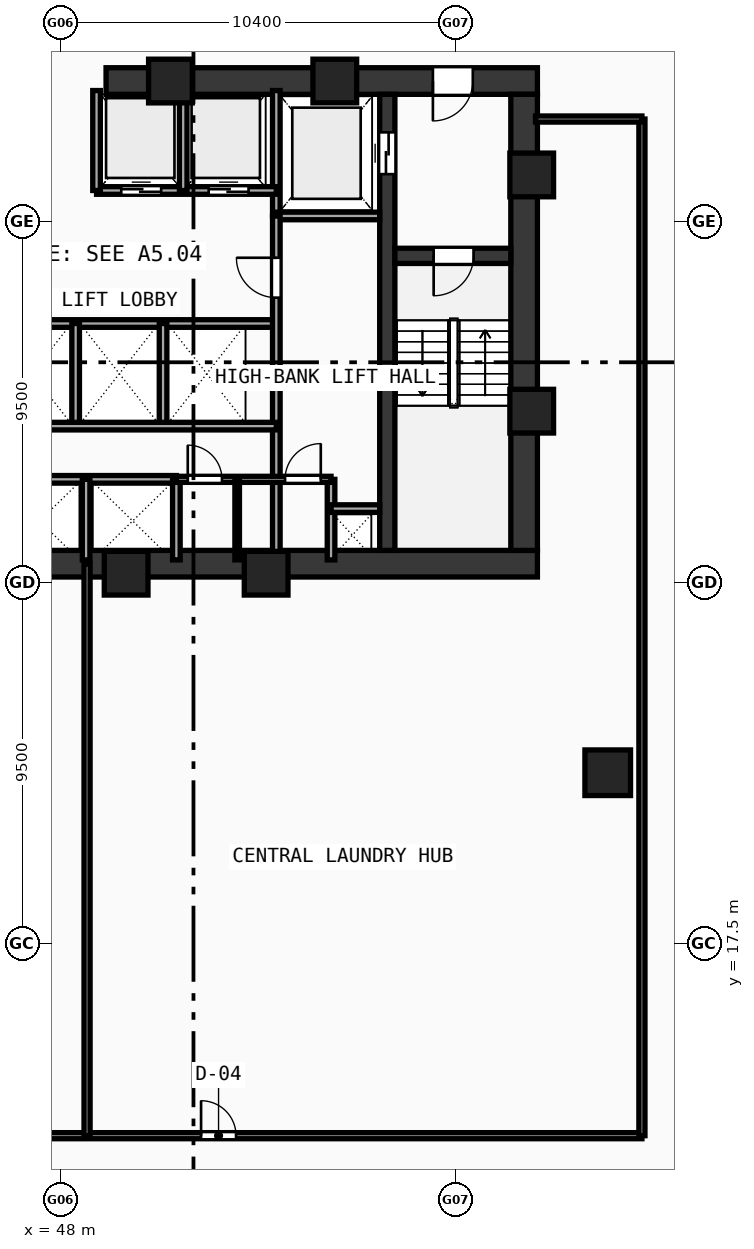
"""IFC4 building model, lengths in metres.
Left out: names, types, materials, properties, quantities, classifications, styles, units other than length and angle.
Written with IfcOpenShell. Run it as: python <this file> out.ifc"""

import sys

from ifc_helpers import new_model, si_unit, direction, frame, frame_2d, origin, origin_with_axes, origin_2d, place, context, subcontext, project, spatial, rectangle, hollow_rectangle, extrude, source, transform, mapped, element, fill, save


model = new_model("IFC4")
c1 = context("Model", 3, precision=1e-05, world=origin(), true_north=direction((0.0, 1.0)))
c2 = subcontext(c1, "Body", "Model", "MODEL_VIEW")
j1 = project(units=[si_unit("LENGTHUNIT", "METRE"), si_unit("PLANEANGLEUNIT", "RADIAN")], contexts=[c1])
p1 = place(None, origin())
s1 = spatial("IfcSite", under=j1, at=p1, CompositionType="ELEMENT")
p2 = place(p1, origin())
s2 = spatial("IfcBuilding", under=s1, at=p2, CompositionType="ELEMENT")
p3 = place(p2, frame((0.0, 0.0, 19.2)))
s3 = spatial("IfcBuildingStorey", under=s2, at=p3, CompositionType="ELEMENT", Elevation=19.2)
p4 = place(p3, frame((35.45, 27.5, 0.0), z_axis=(0.0, 0.0, 1.0), x_axis=(1.0, 0.0, 0.0)))
e1 = element("IfcWall", 1, at=p4, inside=s3, PredefinedType="SHEAR", context=c2, shape_type="SweptSolid", body=[
    extrude(rectangle(XDim=25.1, YDim=0.7, at=frame_2d((12.55, 0.0))), origin(), (0.0, 0.0, 1.0), 5.92),
])
p5 = place(p3, frame((49.2, 40.2, 0.0), z_axis=(0.0, 0.0, 1.0), x_axis=(1.0, 0.0, 0.0)))
e2 = element("IfcWall", 2, at=p5, inside=s3, PredefinedType="SHEAR", context=c2, shape_type="SweptSolid", body=[
    extrude(rectangle(XDim=11.35, YDim=0.7, at=frame_2d((5.675, 0.0))), origin(), (0.0, 0.0, 1.0), 5.92),
])
p6 = place(p5, frame((8.6, 0.0, 0.0)))
e3 = element("IfcOpeningElement", 3, at=p6, cuts=e2, PredefinedType="OPENING", context=c2, shape_type="SweptSolid", body=[
    extrude(rectangle(XDim=1.05, YDim=2.1, at=frame_2d((0.525, 1.05))), frame((0.0, 0.36, 0.0), z_axis=(0.0, -1.0, 0.0), x_axis=(1.0, 0.0, 0.0)), (0.0, 0.0, 1.0), 0.72),
])
p7 = place(p3, frame((60.2, 27.85, 0.0), z_axis=(0.0, 0.0, 1.0), x_axis=(0.0, 1.0, 0.0)))
e4 = element("IfcWall", 4, at=p7, inside=s3, PredefinedType="SHEAR", context=c2, shape_type="SweptSolid", body=[
    extrude(rectangle(XDim=12.0, YDim=0.7, at=frame_2d((6.0, 0.0))), origin(), (0.0, 0.0, 1.0), 5.92),
])
p8 = place(p3, frame((56.6, 27.85, 0.0), z_axis=(0.0, 0.0, 1.0), x_axis=(0.0, 1.0, 0.0)))
e5 = element("IfcWall", 5, at=p8, inside=s3, PredefinedType="SHEAR", context=c2, shape_type="SweptSolid", body=[
    extrude(rectangle(XDim=12.0, YDim=0.4, at=frame_2d((6.0, 0.0))), origin(), (0.0, 0.0, 1.0), 5.92),
])
p9 = place(p8, frame((9.9, 0.0, 0.0)))
e6 = element("IfcOpeningElement", 6, at=p9, cuts=e5, PredefinedType="OPENING", context=c2, shape_type="SweptSolid", body=[
    extrude(rectangle(XDim=1.1, YDim=2.1, at=frame_2d((0.55, 1.05))), frame((0.0, 0.21, 0.0), z_axis=(0.0, -1.0, 0.0), x_axis=(1.0, 0.0, 0.0)), (0.0, 0.0, 1.0), 0.42),
])
p10 = place(p3, frame((56.8, 35.6, 0.0), z_axis=(0.0, 0.0, 1.0), x_axis=(1.0, 0.0, 0.0)))
e7 = element("IfcWall", 7, at=p10, inside=s3, PredefinedType="SHEAR", context=c2, shape_type="SweptSolid", body=[
    extrude(rectangle(XDim=3.05, YDim=0.4, at=frame_2d((1.525, 0.0))), origin(), (0.0, 0.0, 1.0), 5.92),
])
p11 = place(p10, frame((1.02, 0.0, 0.0)))
e8 = element("IfcOpeningElement", 8, at=p11, cuts=e7, PredefinedType="OPENING", context=c2, shape_type="SweptSolid", body=[
    extrude(rectangle(XDim=1.05, YDim=2.1, at=frame_2d((0.525, 1.05))), frame((0.0, 0.21, 0.0), z_axis=(0.0, -1.0, 0.0), x_axis=(1.0, 0.0, 0.0)), (0.0, 0.0, 1.0), 0.42),
])
m1 = source(origin(), c2, "Body", "SweptSolid", [
    extrude(hollow_rectangle(XDim=1.15, YDim=1.15, WallThickness=0.048, at=origin_2d()), origin(), (0.0, 0.0, 1.0), 6.2),
])
for number, where, z_axis, x_axis in (
    (9, (49.729, 27.25, -0.28), (0.0, 0.0, 1.0), (1.0, 0.0, 0.0)),
    (10, (53.412, 27.25, -0.28), (0.0, 0.0, 1.0), (1.0, 0.0, 0.0)),
    (11, (60.4, 31.513, -0.28), (0.0, 0.0, 1.0), (1.0, 0.0, 0.0)),
    (12, (60.4, 37.729, -0.28), (0.0, 0.0, 1.0), (1.0, 0.0, 0.0)),
    (13, (55.219, 40.2, -0.28), (0.0, 0.0, 1.0), (1.0, 0.0, 0.0)),
    (14, (50.894, 40.2, -0.28), (0.0, 0.0, 1.0), (1.0, 0.0, 0.0)),
):
    element("IfcColumn", number, at=place(p3, frame(where, z_axis=z_axis, x_axis=x_axis)), inside=s3, PredefinedType="COLUMN", context=c2, shape_type="MappedRepresentation", body=[
        mapped(m1, transform((0.0, 0.0, 0.0), scale=1.0)),
    ])
m2 = source(origin(), c2, "Body", "SweptSolid", [
    extrude(hollow_rectangle(XDim=1.2, YDim=1.2, WallThickness=0.05, at=origin_2d()), origin(), (0.0, 0.0, 1.0), 6.2),
])
p12 = place(p3, frame((62.4, 22.0, -0.28), z_axis=(0.0, 0.0, 1.0), x_axis=(1.0, 0.0, 0.0)))
e15 = element("IfcColumn", 15, at=p12, inside=s3, PredefinedType="COLUMN", context=c2, shape_type="MappedRepresentation", body=[
    mapped(m2, transform((0.0, 0.0, 0.0), scale=1.0)),
])
p13 = place(p3, frame((53.68, 36.65, 0.0), z_axis=(0.0, 0.0, 1.0), x_axis=(0.0, 1.0, 0.0)))
e16 = element("IfcWall", 16, at=p13, inside=s3, PredefinedType="SOLIDWALL", context=c2, shape_type="SweptSolid", body=[
    extrude(rectangle(XDim=3.3, YDim=0.2, at=frame_2d((1.65, 0.0))), origin(), (0.0, 0.0, 1.0), 5.92),
])
p14 = place(p3, frame((53.68, 36.65, 0.0), z_axis=(0.0, 0.0, 1.0), x_axis=(1.0, 0.0, 0.0)))
e17 = element("IfcWall", 17, at=p14, inside=s3, PredefinedType="SOLIDWALL", context=c2, shape_type="SweptSolid", body=[
    extrude(rectangle(XDim=2.72, YDim=0.2, at=frame_2d((1.36, 0.0))), origin(), (0.0, 0.0, 1.0), 5.92),
])
p15 = place(p3, frame((48.95, 37.32, 0.0), z_axis=(0.0, 0.0, 1.0), x_axis=(1.0, 0.0, 0.0)))
e18 = element("IfcWall", 18, at=p15, inside=s3, PredefinedType="SOLIDWALL", context=c2, shape_type="SweptSolid", body=[
    extrude(rectangle(XDim=4.73, YDim=0.2, at=frame_2d((2.365, 0.0))), origin(), (0.0, 0.0, 1.0), 5.92),
])
p16 = place(p15, frame((0.65, 0.0, 0.0)))
e19 = element("IfcOpeningElement", 19, at=p16, cuts=e18, PredefinedType="OPENING", context=c2, shape_type="SweptSolid", body=[
    extrude(rectangle(XDim=1.05, YDim=2.1, at=frame_2d((0.525, 1.05))), frame((0.0, 0.11, 0.0), z_axis=(0.0, -1.0, 0.0), x_axis=(1.0, 0.0, 0.0)), (0.0, 0.0, 1.0), 0.22),
])
p17 = place(p15, frame((2.95, 0.0, 0.0)))
e20 = element("IfcOpeningElement", 20, at=p17, cuts=e18, PredefinedType="OPENING", context=c2, shape_type="SweptSolid", body=[
    extrude(rectangle(XDim=1.05, YDim=2.1, at=frame_2d((0.525, 1.05))), frame((0.0, 0.11, 0.0), z_axis=(0.0, -1.0, 0.0), x_axis=(1.0, 0.0, 0.0)), (0.0, 0.0, 1.0), 0.22),
])
p18 = place(p3, frame((48.95, 37.32, 0.0), z_axis=(0.0, 0.0, 1.0), x_axis=(0.0, 1.0, 0.0)))
e21 = element("IfcWall", 21, at=p18, inside=s3, PredefinedType="SOLIDWALL", context=c2, shape_type="SweptSolid", body=[
    extrude(rectangle(XDim=2.63, YDim=0.2, at=frame_2d((1.315, 0.0))), origin(), (0.0, 0.0, 1.0), 5.92),
])
p19 = place(p3, frame((51.23, 37.32, 0.0), z_axis=(0.0, 0.0, 1.0), x_axis=(0.0, 1.0, 0.0)))
e22 = element("IfcWall", 22, at=p19, inside=s3, PredefinedType="SOLIDWALL", context=c2, shape_type="SweptSolid", body=[
    extrude(rectangle(XDim=2.63, YDim=0.2, at=frame_2d((1.315, 0.0))), origin(), (0.0, 0.0, 1.0), 2.42),
])
p20 = place(p3, frame((43.85, 33.82, 0.0), z_axis=(0.0, 0.0, 1.0), x_axis=(1.0, 0.0, 0.0)))
e23 = element("IfcWall", 23, at=p20, inside=s3, PredefinedType="SOLIDWALL", context=c2, shape_type="SweptSolid", body=[
    extrude(rectangle(XDim=9.83, YDim=0.2, at=frame_2d((4.915, 0.0))), origin(), (0.0, 0.0, 1.0), 5.92),
])
p21 = place(p3, frame((53.68, 27.6, 0.0), z_axis=(0.0, 0.0, 1.0), x_axis=(0.0, 1.0, 0.0)))
e24 = element("IfcWall", 24, at=p21, inside=s3, PredefinedType="SOLIDWALL", context=c2, shape_type="SweptSolid", body=[
    extrude(rectangle(XDim=9.05, YDim=0.2, at=frame_2d((4.525, 0.0))), origin(), (0.0, 0.0, 1.0), 2.42),
])
p22 = place(p21, frame((6.9, 0.0, 0.0)))
e25 = element("IfcOpeningElement", 25, at=p22, cuts=e24, PredefinedType="OPENING", context=c2, shape_type="SweptSolid", body=[
    extrude(rectangle(XDim=1.05, YDim=2.1, at=frame_2d((0.525, 1.05))), frame((0.0, 0.11, 0.0), z_axis=(0.0, -1.0, 0.0), x_axis=(1.0, 0.0, 0.0)), (0.0, 0.0, 1.0), 0.22),
])
for number, where, z_axis, x_axis in (
    (26, (48.4, 31.12, 0.0), (0.0, 0.0, 1.0), (0.0, 1.0, 0.0)),
    (27, (50.7, 31.12, 0.0), (0.0, 0.0, 1.0), (0.0, 1.0, 0.0)),
):
    element("IfcWall", number, at=place(p3, frame(where, z_axis=z_axis, x_axis=x_axis)), inside=s3, PredefinedType="SOLIDWALL", context=c2, shape_type="SweptSolid", body=[
        extrude(rectangle(XDim=2.7, YDim=0.2, at=frame_2d((1.35, 0.0))), origin(), (0.0, 0.0, 1.0), 5.92),
    ])
p23 = place(p3, frame((43.85, 29.72, 0.0), z_axis=(0.0, 0.0, 1.0), x_axis=(1.0, 0.0, 0.0)))
e28 = element("IfcWall", 28, at=p23, inside=s3, PredefinedType="SOLIDWALL", context=c2, shape_type="SweptSolid", body=[
    extrude(rectangle(XDim=7.2, YDim=0.2, at=frame_2d((3.6, 0.0))), origin(), (0.0, 0.0, 1.0), 5.92),
])
p24 = place(p3, frame((51.05, 27.6, 0.0), z_axis=(0.0, 0.0, 1.0), x_axis=(0.0, 1.0, 0.0)))
e29 = element("IfcWall", 29, at=p24, inside=s3, PredefinedType="SOLIDWALL", context=c2, shape_type="SweptSolid", body=[
    extrude(rectangle(XDim=2.12, YDim=0.2, at=frame_2d((1.06, 0.0))), origin(), (0.0, 0.0, 1.0), 5.92),
])
p25 = place(p3, frame((43.85, 31.12, 0.0), z_axis=(0.0, 0.0, 1.0), x_axis=(1.0, 0.0, 0.0)))
e30 = element("IfcWall", 30, at=p25, inside=s3, PredefinedType="SOLIDWALL", context=c2, shape_type="SweptSolid", body=[
    extrude(rectangle(XDim=9.83, YDim=0.2, at=frame_2d((4.915, 0.0))), origin(), (0.0, 0.0, 1.0), 5.92),
])
for number, where, z_axis, x_axis in (
    (31, (48.675, 27.6, 0.0), (0.0, 0.0, 1.0), (0.0, 1.0, 0.0)),
    (32, (55.12, 27.6, 0.0), (0.0, 0.0, 1.0), (0.0, 1.0, 0.0)),
):
    element("IfcWall", number, at=place(p3, frame(where, z_axis=z_axis, x_axis=x_axis)), inside=s3, PredefinedType="SOLIDWALL", context=c2, shape_type="SweptSolid", body=[
        extrude(rectangle(XDim=2.12, YDim=0.2, at=frame_2d((1.06, 0.0))), origin(), (0.0, 0.0, 1.0), 5.92),
    ])
p26 = place(p3, frame((55.12, 28.95, 0.0), z_axis=(0.0, 0.0, 1.0), x_axis=(1.0, 0.0, 0.0)))
e33 = element("IfcWall", 33, at=p26, inside=s3, PredefinedType="SOLIDWALL", context=c2, shape_type="SweptSolid", body=[
    extrude(rectangle(XDim=1.28, YDim=0.2, at=frame_2d((0.64, 0.0))), origin(), (0.0, 0.0, 1.0), 5.92),
])
p27 = place(p3, frame((51.05, 29.72, 0.0), z_axis=(0.0, 0.0, 1.0), x_axis=(1.0, 0.0, 0.0)))
e34 = element("IfcWall", 34, at=p27, inside=s3, PredefinedType="PARTITIONING", context=c2, shape_type="SweptSolid", body=[
    extrude(rectangle(XDim=4.07, YDim=0.16, at=frame_2d((2.035, 0.0))), origin(), (0.0, 0.0, 1.0), 5.92),
])
p28 = place(p27, frame((0.3, 0.0, 0.0)))
e35 = element("IfcOpeningElement", 35, at=p28, cuts=e34, PredefinedType="OPENING", context=c2, shape_type="SweptSolid", body=[
    extrude(rectangle(XDim=0.9, YDim=2.1, at=frame_2d((0.45, 1.05))), frame((0.0, 0.09, 0.0), z_axis=(0.0, -1.0, 0.0), x_axis=(1.0, 0.0, 0.0)), (0.0, 0.0, 1.0), 0.18),
])
p29 = place(p27, frame((2.86, 0.0, 0.0)))
e36 = element("IfcOpeningElement", 36, at=p29, cuts=e34, PredefinedType="OPENING", context=c2, shape_type="SweptSolid", body=[
    extrude(rectangle(XDim=0.94, YDim=2.1, at=frame_2d((0.47, 1.05))), frame((0.0, 0.09, 0.0), z_axis=(0.0, -1.0, 0.0), x_axis=(1.0, 0.0, 0.0)), (0.0, 0.0, 1.0), 0.18),
])
p30 = place(p3, frame((52.65, 27.6, 0.0), z_axis=(0.0, 0.0, 1.0), x_axis=(0.0, 1.0, 0.0)))
e37 = element("IfcWall", 37, at=p30, inside=s3, PredefinedType="PARTITIONING", context=c2, shape_type="SweptSolid", body=[
    extrude(rectangle(XDim=2.12, YDim=0.12, at=frame_2d((1.06, 0.0))), origin(), (0.0, 0.0, 1.0), 5.92),
])
p31 = place(p3, frame((32.7, 12.45, 0.0), z_axis=(0.0, 0.0, 1.0), x_axis=(1.0, 0.0, 0.0)))
e38 = element("IfcWall", 38, at=p31, inside=s3, PredefinedType="PARTITIONING", context=c2, shape_type="SweptSolid", body=[
    extrude(rectangle(XDim=30.6, YDim=0.16, at=frame_2d((15.3, 0.0))), origin(), (0.0, 0.0, 1.0), 2.42),
])
p32 = place(p31, frame((19.0, 0.0, 0.0)))
e39 = element("IfcOpeningElement", 39, at=p32, cuts=e38, PredefinedType="OPENING", context=c2, shape_type="SweptSolid", body=[
    extrude(rectangle(XDim=0.92, YDim=2.1, at=frame_2d((0.46, 1.05))), frame((0.0, 0.09, 0.0), z_axis=(0.0, -1.0, 0.0), x_axis=(1.0, 0.0, 0.0)), (0.0, 0.0, 1.0), 0.18),
])
p33 = place(p31, frame((5.9, 0.0, 0.0)))
e40 = element("IfcOpeningElement", 40, at=p33, cuts=e38, PredefinedType="OPENING", context=c2, shape_type="SweptSolid", body=[
    extrude(rectangle(XDim=0.94, YDim=2.1, at=frame_2d((0.47, 1.05))), frame((0.0, 0.09, 0.0), z_axis=(0.0, -1.0, 0.0), x_axis=(1.0, 0.0, 0.0)), (0.0, 0.0, 1.0), 0.18),
])
p34 = place(p3, frame((63.3, 12.45, 0.0), z_axis=(0.0, 0.0, 1.0), x_axis=(0.0, 1.0, 0.0)))
e41 = element("IfcWall", 41, at=p34, inside=s3, PredefinedType="PARTITIONING", context=c2, shape_type="SweptSolid", body=[
    extrude(rectangle(XDim=26.75, YDim=0.16, at=frame_2d((13.375, 0.0))), origin(), (0.0, 0.0, 1.0), 2.42),
])
p35 = place(p3, frame((60.5, 39.2, 0.0), z_axis=(0.0, 0.0, 1.0), x_axis=(1.0, 0.0, 0.0)))
e42 = element("IfcWall", 42, at=p35, inside=s3, PredefinedType="PARTITIONING", context=c2, shape_type="SweptSolid", body=[
    extrude(rectangle(XDim=2.8, YDim=0.16, at=frame_2d((1.4, 0.0))), origin(), (0.0, 0.0, 1.0), 2.42),
])
p36 = place(p3, frame((48.7, 12.45, 0.0), z_axis=(0.0, 0.0, 1.0), x_axis=(0.0, 1.0, 0.0)))
e43 = element("IfcWall", 43, at=p36, inside=s3, PredefinedType="PARTITIONING", context=c2, shape_type="SweptSolid", body=[
    extrude(rectangle(XDim=15.05, YDim=0.16, at=frame_2d((7.525, 0.0))), origin(), (0.0, 0.0, 1.0), 5.22),
])
m3 = source(origin(), c2, "Body", "SweptSolid", [
    extrude(rectangle(XDim=1.05, YDim=2.1, at=frame_2d((0.525, 1.05))), frame((0.0, 0.025, 0.0), z_axis=(0.0, -1.0, 0.0), x_axis=(1.0, 0.0, 0.0)), (0.0, 0.0, 1.0), 0.05),
])
p37 = place(p11, frame((1.05, 0.0, 0.0), z_axis=(0.0, 0.0, 1.0), x_axis=(-1.0, 0.0, 0.0)))
e44 = element("IfcDoor", 44, at=p37, inside=s3, OperationType="SINGLE_SWING_RIGHT", PredefinedType="DOOR", context=c2, shape_type="MappedRepresentation", body=[
    mapped(m3, transform((0.0, 0.0, 0.0), scale=1.0)),
])
fill(e8, e44)
p38 = place(p6, frame((1.05, 0.0, 0.0), z_axis=(0.0, 0.0, 1.0), x_axis=(-1.0, 0.0, 0.0)))
e45 = element("IfcDoor", 45, at=p38, inside=s3, OperationType="SINGLE_SWING_RIGHT", PredefinedType="DOOR", context=c2, shape_type="MappedRepresentation", body=[
    mapped(m3, transform((0.0, 0.0, 0.0), scale=1.0)),
])
fill(e3, e45)
m4 = source(origin(), c2, "Body", "SweptSolid", [
    extrude(rectangle(XDim=1.1, YDim=2.1, at=frame_2d((0.55, 1.05))), frame((0.0, 0.025, 0.0), z_axis=(0.0, -1.0, 0.0), x_axis=(1.0, 0.0, 0.0)), (0.0, 0.0, 1.0), 0.05),
])
p39 = place(p9, origin_with_axes())
e46 = element("IfcDoor", 46, at=p39, inside=s3, OperationType="DOUBLE_DOOR_SLIDING", PredefinedType="DOOR", context=c2, shape_type="MappedRepresentation", body=[
    mapped(m4, transform((0.0, 0.0, 0.0), scale=1.0)),
])
fill(e6, e46)
p40 = place(p16, frame((1.05, 0.0, 0.0), z_axis=(0.0, 0.0, 1.0), x_axis=(-1.0, 0.0, 0.0)))
e47 = element("IfcDoor", 47, at=p40, inside=s3, OperationType="DOUBLE_DOOR_SLIDING", PredefinedType="DOOR", context=c2, shape_type="MappedRepresentation", body=[
    mapped(m3, transform((0.0, 0.0, 0.0), scale=1.0)),
])
fill(e19, e47)
p41 = place(p17, frame((1.05, 0.0, 0.0), z_axis=(0.0, 0.0, 1.0), x_axis=(-1.0, 0.0, 0.0)))
e48 = element("IfcDoor", 48, at=p41, inside=s3, OperationType="DOUBLE_DOOR_SLIDING", PredefinedType="DOOR", context=c2, shape_type="MappedRepresentation", body=[
    mapped(m3, transform((0.0, 0.0, 0.0), scale=1.0)),
])
fill(e20, e48)
p42 = place(p22, origin_with_axes())
e49 = element("IfcDoor", 49, at=p42, inside=s3, OperationType="SINGLE_SWING_RIGHT", PredefinedType="DOOR", context=c2, shape_type="MappedRepresentation", body=[
    mapped(m3, transform((0.0, 0.0, 0.0), scale=1.0)),
])
fill(e25, e49)
m5 = source(origin(), c2, "Body", "SweptSolid", [
    extrude(rectangle(XDim=0.9, YDim=2.1, at=frame_2d((0.45, 1.05))), frame((0.0, 0.025, 0.0), z_axis=(0.0, -1.0, 0.0), x_axis=(1.0, 0.0, 0.0)), (0.0, 0.0, 1.0), 0.05),
])
p43 = place(p28, origin_with_axes())
e50 = element("IfcDoor", 50, at=p43, inside=s3, OperationType="SINGLE_SWING_LEFT", PredefinedType="DOOR", context=c2, shape_type="MappedRepresentation", body=[
    mapped(m5, transform((0.0, 0.0, 0.0), scale=1.0)),
])
fill(e35, e50)
m6 = source(origin(), c2, "Body", "SweptSolid", [
    extrude(rectangle(XDim=0.94, YDim=2.1, at=frame_2d((0.47, 1.05))), frame((0.0, 0.025, 0.0), z_axis=(0.0, -1.0, 0.0), x_axis=(1.0, 0.0, 0.0)), (0.0, 0.0, 1.0), 0.05),
])
p44 = place(p29, origin_with_axes())
e51 = element("IfcDoor", 51, at=p44, inside=s3, OperationType="SINGLE_SWING_RIGHT", PredefinedType="DOOR", context=c2, shape_type="MappedRepresentation", body=[
    mapped(m6, transform((0.0, 0.0, 0.0), scale=1.0)),
])
fill(e36, e51)
m7 = source(origin(), c2, "Body", "SweptSolid", [
    extrude(rectangle(XDim=0.92, YDim=2.1, at=frame_2d((0.46, 1.05))), frame((0.0, 0.025, 0.0), z_axis=(0.0, -1.0, 0.0), x_axis=(1.0, 0.0, 0.0)), (0.0, 0.0, 1.0), 0.05),
])
p45 = place(p32, origin_with_axes())
e52 = element("IfcDoor", 52, at=p45, inside=s3, OperationType="SINGLE_SWING_LEFT", PredefinedType="DOOR", context=c2, shape_type="MappedRepresentation", body=[
    mapped(m7, transform((0.0, 0.0, 0.0), scale=1.0)),
])
fill(e39, e52)
save(model, sys.argv[1])
